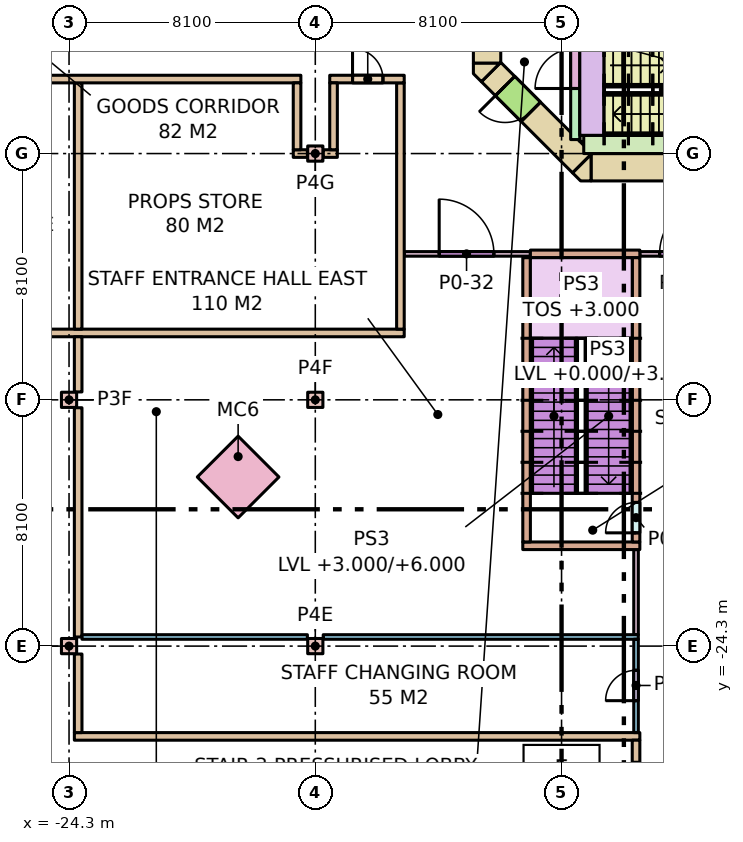
"""IFC4 building model, lengths in metres.
Left out: names, types, materials, properties, quantities, classifications, styles, units other than length and angle.
Written with IfcOpenShell. Run it as: python <this file> out.ifc"""

import sys

from ifc_helpers import new_model, si_unit, direction, frame, frame_2d, origin, origin_2d, place, context, subcontext, project, spatial, polyline, rectangle, outline, extrude, element, fill, save


model = new_model("IFC4")
c1 = context("Model", 3, precision=1e-05, world=origin(), true_north=direction((0.0, 1.0)))
c2 = subcontext(c1, "Body", "Model", "MODEL_VIEW")
j1 = project(units=[si_unit("LENGTHUNIT", "METRE"), si_unit("PLANEANGLEUNIT", "RADIAN")], contexts=[c1])
p1 = place(None, origin())
s1 = spatial("IfcSite", under=j1, at=p1, CompositionType="ELEMENT")
p2 = place(p1, origin())
s2 = spatial("IfcBuilding", under=s1, at=p2, CompositionType="ELEMENT")
p3 = place(p2, origin())
s3 = spatial("IfcBuildingStorey", under=s2, at=p3, CompositionType="ELEMENT", Elevation=0.0)
for number, where, z_axis, x_axis in (
    (1, (-24.3, -24.3, 0.0), (0.0, 0.0, 1.0), (1.0, 0.0, 0.0)),
    (2, (-24.3, -16.2, 0.0), (0.0, 0.0, 1.0), (1.0, 0.0, 0.0)),
    (3, (-16.2, -24.3, 0.0), (0.0, 0.0, 1.0), (1.0, 0.0, 0.0)),
    (4, (-16.2, -16.2, 0.0), (0.0, 0.0, 1.0), (1.0, 0.0, 0.0)),
    (5, (-16.2, -8.1, 0.0), (0.0, 0.0, 1.0), (1.0, 0.0, 0.0)),
):
    element("IfcColumn", number, at=place(p3, frame(where, z_axis=z_axis, x_axis=x_axis)), inside=s3, PredefinedType="COLUMN", context=c2, shape_type="SweptSolid", body=[
        extrude(rectangle(XDim=0.5, YDim=0.5, at=origin_2d()), origin(), (0.0, 0.0, 1.0), 6.0),
    ])
p4 = place(p3, frame((-18.738, -18.738, 0.0), z_axis=(0.0, 0.0, 1.0), x_axis=(0.707106781187, -0.707106781187, 0.0)))
e6 = element("IfcColumn", 6, at=p4, inside=s3, PredefinedType="COLUMN", context=c2, shape_type="SweptSolid", body=[
    extrude(rectangle(XDim=1.9, YDim=1.9, at=origin_2d()), origin(), (0.0, 0.0, 1.0), 6.0),
])
p5 = place(p3, frame((-7.13, -8.55, -0.32), z_axis=(0.0, 0.0, 1.0), x_axis=(1.0, 0.0, 0.0)))
e7 = element("IfcWall", 7, at=p5, inside=s3, PredefinedType="SHEAR", context=c2, shape_type="SweptSolid", body=[
    extrude(rectangle(XDim=14.26, YDim=0.9, at=frame_2d((7.13, 0.0))), origin(), (0.0, 0.0, 1.0), 6.0),
])
p6 = place(p5, frame((8.08, 0.0, 0.32)))
e8 = element("IfcOpeningElement", 8, at=p6, cuts=e7, PredefinedType="OPENING", context=c2, shape_type="SweptSolid", body=[
    extrude(rectangle(XDim=0.7, YDim=2.1, at=frame_2d((0.35, 1.05))), frame((0.0, 0.46, 0.0), z_axis=(0.0, -1.0, 0.0), x_axis=(1.0, 0.0, 0.0)), (0.0, 0.0, 1.0), 0.92),
])
p7 = place(p5, frame((5.58, 0.0, 0.32)))
e9 = element("IfcOpeningElement", 9, at=p7, cuts=e7, PredefinedType="OPENING", context=c2, shape_type="SweptSolid", body=[
    extrude(rectangle(XDim=0.85, YDim=2.1, at=frame_2d((0.425, 1.05))), frame((0.0, 0.46, 0.0), z_axis=(0.0, -1.0, 0.0), x_axis=(1.0, 0.0, 0.0)), (0.0, 0.0, 1.0), 0.92),
])
p8 = place(p5, frame((6.88, 0.0, 0.32)))
e10 = element("IfcOpeningElement", 10, at=p8, cuts=e7, PredefinedType="OPENING", context=c2, shape_type="SweptSolid", body=[
    extrude(rectangle(XDim=0.85, YDim=2.1, at=frame_2d((0.425, 1.05))), frame((0.0, 0.46, 0.0), z_axis=(0.0, -1.0, 0.0), x_axis=(1.0, 0.0, 0.0)), (0.0, 0.0, 1.0), 0.92),
])
p9 = place(p5, frame((9.967, 0.0, 0.32)))
e11 = element("IfcOpeningElement", 11, at=p9, cuts=e7, PredefinedType="OPENING", context=c2, shape_type="SweptSolid", body=[
    extrude(rectangle(XDim=0.9, YDim=2.1, at=frame_2d((0.45, 1.05))), frame((0.0, 0.46, 0.0), z_axis=(0.0, -1.0, 0.0), x_axis=(1.0, 0.0, 0.0)), (0.0, 0.0, 1.0), 0.92),
])
p10 = place(p5, frame((12.567, 0.0, 0.32)))
e12 = element("IfcOpeningElement", 12, at=p10, cuts=e7, PredefinedType="OPENING", context=c2, shape_type="SweptSolid", body=[
    extrude(rectangle(XDim=0.9, YDim=2.1, at=frame_2d((0.45, 1.05))), frame((0.0, 0.46, 0.0), z_axis=(0.0, -1.0, 0.0), x_axis=(1.0, 0.0, 0.0)), (0.0, 0.0, 1.0), 0.92),
])
p11 = place(p3, frame((-10.55, -5.13, -0.32), z_axis=(0.0, 0.0, 1.0), x_axis=(0.0, 1.0, 0.0)))
e13 = element("IfcWall", 13, at=p11, inside=s3, PredefinedType="SHEAR", context=c2, shape_type="SweptSolid", body=[
    extrude(rectangle(XDim=10.26, YDim=0.9, at=frame_2d((5.13, 0.0))), origin(), (0.0, 0.0, 1.0), 6.0),
])
p12 = place(p11, frame((4.13, 0.0, 0.32)))
e14 = element("IfcOpeningElement", 14, at=p12, cuts=e13, PredefinedType="OPENING", context=c2, shape_type="SweptSolid", body=[
    extrude(rectangle(XDim=2.0, YDim=2.1, at=frame_2d((1.0, 1.05))), frame((0.0, 0.46, 0.0), z_axis=(0.0, -1.0, 0.0), x_axis=(1.0, 0.0, 0.0)), (0.0, 0.0, 1.0), 0.92),
])
p13 = place(p3, frame((-7.418, -8.418, -0.32), z_axis=(0.0, 0.0, 1.0), x_axis=(-0.707106781187, 0.707106781187, 0.0)))
e15 = element("IfcWall", 15, at=p13, inside=s3, PredefinedType="SHEAR", context=c2, shape_type="SweptSolid", body=[
    extrude(rectangle(XDim=4.243, YDim=0.9, at=frame_2d((2.121, 0.0))), origin(), (0.0, 0.0, 1.0), 6.0),
])
p14 = place(p13, frame((2.393, 0.0, 0.32)))
e16 = element("IfcOpeningElement", 16, at=p14, cuts=e15, PredefinedType="OPENING", context=c2, shape_type="SweptSolid", body=[
    extrude(rectangle(XDim=1.2, YDim=2.1, at=frame_2d((0.6, 1.05))), frame((0.0, 0.46, 0.0), z_axis=(0.0, -1.0, 0.0), x_axis=(1.0, 0.0, 0.0)), (0.0, 0.0, 1.0), 0.92),
])
p15 = place(p3, frame((0.0, 0.0, -0.32)))
e17 = element("IfcWall", 17, at=p15, inside=s3, PredefinedType="SHEAR", context=c2, shape_type="SweptSolid", body=[
    extrude(outline(polyline([(-7.473, -9.0), (-7.736, -8.736), (-7.13, -8.13), (-7.13, -9.0), (-7.473, -9.0)])), origin(), (0.0, 0.0, 1.0), 6.0),
])
p16 = place(p3, frame((0.0, 0.0, -0.32)))
e18 = element("IfcWall", 18, at=p16, inside=s3, PredefinedType="SHEAR", context=c2, shape_type="SweptSolid", body=[
    extrude(outline(polyline([(-11.0, -5.473), (-11.0, -5.13), (-10.13, -5.13), (-10.736, -5.736), (-11.0, -5.473)])), origin(), (0.0, 0.0, 1.0), 6.0),
])
p17 = place(p3, frame((-7.65, -7.64, 0.0), z_axis=(0.0, 0.0, 1.0), x_axis=(0.0, 1.0, 0.0)))
e19 = element("IfcWall", 19, at=p17, inside=s3, PredefinedType="SHEAR", context=c2, shape_type="SweptSolid", body=[
    extrude(rectangle(XDim=3.14, YDim=0.3, at=frame_2d((1.57, 0.0))), origin(), (0.0, 0.0, 1.0), 5.68),
])
p18 = place(p17, frame((1.68, 0.0, 0.0)))
e20 = element("IfcOpeningElement", 20, at=p18, cuts=e19, PredefinedType="OPENING", context=c2, shape_type="SweptSolid", body=[
    extrude(rectangle(XDim=1.32, YDim=2.1, at=frame_2d((0.66, 1.05))), frame((0.0, 0.16, 0.0), z_axis=(0.0, -1.0, 0.0), x_axis=(1.0, 0.0, 0.0)), (0.0, 0.0, 1.0), 0.32),
])
p19 = place(p3, frame((-7.5, -7.6, 0.0), z_axis=(0.0, 0.0, 1.0), x_axis=(1.0, 0.0, 0.0)))
e21 = element("IfcWall", 21, at=p19, inside=s3, PredefinedType="SHEAR", context=c2, shape_type="SweptSolid", body=[
    extrude(rectangle(XDim=0.6, YDim=0.2, at=frame_2d((0.3, 0.0))), origin(), (0.0, 0.0, 1.0), 5.68),
])
p20 = place(p3, frame((-7.37, -7.8, 0.0), z_axis=(0.0, 0.0, 1.0), x_axis=(1.0, 0.0, 0.0)))
e22 = element("IfcWall", 22, at=p20, inside=s3, PredefinedType="SHEAR", context=c2, shape_type="SweptSolid", body=[
    extrude(rectangle(XDim=5.37, YDim=0.6, at=frame_2d((2.685, 0.0))), origin(), (0.0, 0.0, 1.0), 5.68),
])
p21 = place(p3, frame((-24.125, -27.27, 0.0), z_axis=(0.0, 0.0, 1.0), x_axis=(1.0, 0.0, 0.0)))
e23 = element("IfcWall", 23, at=p21, inside=s3, PredefinedType="PARTITIONING", context=c2, shape_type="SweptSolid", body=[
    extrude(rectangle(XDim=18.6, YDim=0.25, at=frame_2d((9.3, 0.0))), origin(), (0.0, 0.0, 1.0), 5.68),
])
p22 = place(p3, frame((-24.0, -27.145, 0.0), z_axis=(0.0, 0.0, 1.0), x_axis=(0.0, 1.0, 0.0)))
e24 = element("IfcWall", 24, at=p22, inside=s3, PredefinedType="PARTITIONING", context=c2, shape_type="SweptSolid", body=[
    extrude(rectangle(XDim=2.585, YDim=0.25, at=frame_2d((1.292, 0.0))), origin(), (0.0, 0.0, 1.0), 5.68),
])
p23 = place(p3, frame((-23.875, -24.0, 0.0), z_axis=(0.0, 0.0, 1.0), x_axis=(1.0, 0.0, 0.0)))
e25 = element("IfcWall", 25, at=p23, inside=s3, PredefinedType="PARTITIONING", context=c2, shape_type="SweptSolid", body=[
    extrude(rectangle(XDim=7.415, YDim=0.15, at=frame_2d((3.708, 0.0))), origin(), (0.0, 0.0, 1.0), 5.68),
])
p24 = place(p3, frame((-15.94, -24.0, 0.0), z_axis=(0.0, 0.0, 1.0), x_axis=(1.0, 0.0, 0.0)))
e26 = element("IfcWall", 26, at=p24, inside=s3, PredefinedType="PARTITIONING", context=c2, shape_type="SweptSolid", body=[
    extrude(rectangle(XDim=10.365, YDim=0.15, at=frame_2d((5.183, 0.0))), origin(), (0.0, 0.0, 1.0), 5.68),
])
p25 = place(p3, frame((-5.65, -27.145, 0.0), z_axis=(0.0, 0.0, 1.0), x_axis=(0.0, 1.0, 0.0)))
e27 = element("IfcWall", 27, at=p25, inside=s3, PredefinedType="PARTITIONING", context=c2, shape_type="SweptSolid", body=[
    extrude(rectangle(XDim=3.07, YDim=0.15, at=frame_2d((1.535, 0.0))), origin(), (0.0, 0.0, 1.0), 5.68),
])
p26 = place(p25, frame((1.05, 0.0, 0.0)))
e28 = element("IfcOpeningElement", 28, at=p26, cuts=e27, PredefinedType="OPENING", context=c2, shape_type="SweptSolid", body=[
    extrude(rectangle(XDim=1.0, YDim=2.1, at=frame_2d((0.5, 1.05))), frame((0.0, 0.085, 0.0), z_axis=(0.0, -1.0, 0.0), x_axis=(1.0, 0.0, 0.0)), (0.0, 0.0, 1.0), 0.17),
])
p27 = place(p3, frame((-37.5, -14.0, 0.0), z_axis=(0.0, 0.0, 1.0), x_axis=(1.0, 0.0, 0.0)))
e29 = element("IfcWall", 29, at=p27, inside=s3, PredefinedType="PARTITIONING", context=c2, shape_type="SweptSolid", body=[
    extrude(rectangle(XDim=24.225, YDim=0.25, at=frame_2d((12.113, 0.0))), origin(), (0.0, 0.0, 1.0), 5.68),
])
p28 = place(p3, frame((-24.0, -24.0, 0.0), z_axis=(0.0, 0.0, 1.0), x_axis=(0.0, 1.0, 0.0)))
e30 = element("IfcWall", 30, at=p28, inside=s3, PredefinedType="PARTITIONING", context=c2, shape_type="SweptSolid", body=[
    extrude(rectangle(XDim=7.54, YDim=0.25, at=frame_2d((3.77, 0.0))), origin(), (0.0, 0.0, 1.0), 5.68),
])
p29 = place(p3, frame((-24.0, -15.94, 0.0), z_axis=(0.0, 0.0, 1.0), x_axis=(0.0, 1.0, 0.0)))
e31 = element("IfcWall", 31, at=p29, inside=s3, PredefinedType="PARTITIONING", context=c2, shape_type="SweptSolid", body=[
    extrude(rectangle(XDim=1.815, YDim=0.25, at=frame_2d((0.907, 0.0))), origin(), (0.0, 0.0, 1.0), 5.68),
])
p30 = place(p3, frame((-5.65, -29.875, 0.0), z_axis=(0.0, 0.0, 1.0), x_axis=(0.0, 1.0, 0.0)))
e32 = element("IfcWall", 32, at=p30, inside=s3, PredefinedType="PARTITIONING", context=c2, shape_type="SweptSolid", body=[
    extrude(rectangle(XDim=2.48, YDim=0.25, at=frame_2d((1.24, 0.0))), origin(), (0.0, 0.0, 1.0), 5.68),
])
p31 = place(p30, frame((0.75, 0.0, 0.0)))
e33 = element("IfcOpeningElement", 33, at=p31, cuts=e32, PredefinedType="OPENING", context=c2, shape_type="SweptSolid", body=[
    extrude(rectangle(XDim=1.0, YDim=2.1, at=frame_2d((0.5, 1.05))), frame((0.0, 0.135, 0.0), z_axis=(0.0, -1.0, 0.0), x_axis=(1.0, 0.0, 0.0)), (0.0, 0.0, 1.0), 0.27),
])
p32 = place(p3, frame((-24.0, -13.875, 0.0), z_axis=(0.0, 0.0, 1.0), x_axis=(0.0, 1.0, 0.0)))
e34 = element("IfcWall", 34, at=p32, inside=s3, PredefinedType="PARTITIONING", context=c2, shape_type="SweptSolid", body=[
    extrude(rectangle(XDim=8.1, YDim=0.25, at=frame_2d((4.05, 0.0))), origin(), (0.0, 0.0, 1.0), 5.68),
])
p33 = place(p3, frame((-31.925, -5.65, 0.0), z_axis=(0.0, 0.0, 1.0), x_axis=(1.0, 0.0, 0.0)))
e35 = element("IfcWall", 35, at=p33, inside=s3, PredefinedType="PARTITIONING", context=c2, shape_type="SweptSolid", body=[
    extrude(rectangle(XDim=15.25, YDim=0.25, at=frame_2d((7.625, 0.0))), origin(), (0.0, 0.0, 1.0), 5.68),
])
p34 = place(p33, frame((3.55, 0.0, 0.0)))
e36 = element("IfcOpeningElement", 36, at=p34, cuts=e35, PredefinedType="OPENING", context=c2, shape_type="SweptSolid", body=[
    extrude(rectangle(XDim=1.0, YDim=2.1, at=frame_2d((0.5, 1.05))), frame((0.0, 0.135, 0.0), z_axis=(0.0, -1.0, 0.0), x_axis=(1.0, 0.0, 0.0)), (0.0, 0.0, 1.0), 0.27),
])
p35 = place(p3, frame((-9.125, -11.4, 0.0), z_axis=(0.0, 0.0, 1.0), x_axis=(1.0, 0.0, 0.0)))
e37 = element("IfcWall", 37, at=p35, inside=s3, PredefinedType="STANDARD", context=c2, shape_type="SweptSolid", body=[
    extrude(rectangle(XDim=3.6, YDim=0.25, at=frame_2d((1.8, 0.0))), origin(), (0.0, 0.0, 1.0), 5.68),
])
p36 = place(p3, frame((-9.375, -21.0, 0.0), z_axis=(0.0, 0.0, 1.0), x_axis=(1.0, 0.0, 0.0)))
e38 = element("IfcWall", 38, at=p36, inside=s3, PredefinedType="STANDARD", context=c2, shape_type="SweptSolid", body=[
    extrude(rectangle(XDim=3.85, YDim=0.25, at=frame_2d((1.925, 0.0))), origin(), (0.0, 0.0, 1.0), 5.68),
])
p37 = place(p3, frame((-9.25, -20.875, 0.0), z_axis=(0.0, 0.0, 1.0), x_axis=(0.0, 1.0, 0.0)))
e39 = element("IfcWall", 39, at=p37, inside=s3, PredefinedType="STANDARD", context=c2, shape_type="SweptSolid", body=[
    extrude(rectangle(XDim=9.35, YDim=0.25, at=frame_2d((4.675, 0.0))), origin(), (0.0, 0.0, 1.0), 5.68),
])
p38 = place(p3, frame((-5.65, -20.875, 0.0), z_axis=(0.0, 0.0, 1.0), x_axis=(0.0, 1.0, 0.0)))
e40 = element("IfcWall", 40, at=p38, inside=s3, PredefinedType="STANDARD", context=c2, shape_type="SweptSolid", body=[
    extrude(rectangle(XDim=9.35, YDim=0.25, at=frame_2d((4.675, 0.0))), origin(), (0.0, 0.0, 1.0), 5.68),
])
p39 = place(p38, frame((0.3, 0.0, 0.0)))
e41 = element("IfcOpeningElement", 41, at=p39, cuts=e40, PredefinedType="OPENING", context=c2, shape_type="SweptSolid", body=[
    extrude(rectangle(XDim=1.0, YDim=2.1, at=frame_2d((0.5, 1.05))), frame((0.0, 0.135, 0.0), z_axis=(0.0, -1.0, 0.0), x_axis=(1.0, 0.0, 0.0)), (0.0, 0.0, 1.0), 0.27),
])
p40 = place(p3, frame((-13.4, -13.875, 0.0), z_axis=(0.0, 0.0, 1.0), x_axis=(0.0, 1.0, 0.0)))
e42 = element("IfcWall", 42, at=p40, inside=s3, PredefinedType="PARTITIONING", context=c2, shape_type="SweptSolid", body=[
    extrude(rectangle(XDim=8.1, YDim=0.25, at=frame_2d((4.05, 0.0))), origin(), (0.0, 0.0, 1.0), 5.68),
])
p41 = place(p3, frame((-16.925, -8.1, 0.0), z_axis=(0.0, 0.0, 1.0), x_axis=(1.0, 0.0, 0.0)))
e43 = element("IfcWall", 43, at=p41, inside=s3, PredefinedType="PARTITIONING", context=c2, shape_type="SweptSolid", body=[
    extrude(rectangle(XDim=0.465, YDim=0.25, at=frame_2d((0.232, 0.0))), origin(), (0.0, 0.0, 1.0), 5.68),
])
p42 = place(p3, frame((-15.94, -8.1, 0.0), z_axis=(0.0, 0.0, 1.0), x_axis=(1.0, 0.0, 0.0)))
e44 = element("IfcWall", 44, at=p42, inside=s3, PredefinedType="PARTITIONING", context=c2, shape_type="SweptSolid", body=[
    extrude(rectangle(XDim=0.465, YDim=0.25, at=frame_2d((0.232, 0.0))), origin(), (0.0, 0.0, 1.0), 5.68),
])
p43 = place(p3, frame((-15.725, -5.65, 0.0), z_axis=(0.0, 0.0, 1.0), x_axis=(1.0, 0.0, 0.0)))
e45 = element("IfcWall", 45, at=p43, inside=s3, PredefinedType="PARTITIONING", context=c2, shape_type="SweptSolid", body=[
    extrude(rectangle(XDim=2.45, YDim=0.25, at=frame_2d((1.225, 0.0))), origin(), (0.0, 0.0, 1.0), 5.68),
])
p44 = place(p43, frame((0.75, 0.0, 0.0)))
e46 = element("IfcOpeningElement", 46, at=p44, cuts=e45, PredefinedType="OPENING", context=c2, shape_type="SweptSolid", body=[
    extrude(rectangle(XDim=1.0, YDim=2.1, at=frame_2d((0.5, 1.05))), frame((0.0, 0.135, 0.0), z_axis=(0.0, -1.0, 0.0), x_axis=(1.0, 0.0, 0.0)), (0.0, 0.0, 1.0), 0.27),
])
for number, where, z_axis, x_axis in (
    (47, (-16.8, -7.975, 0.0), (0.0, 0.0, 1.0), (0.0, 1.0, 0.0)),
    (48, (-15.6, -7.975, 0.0), (0.0, 0.0, 1.0), (0.0, 1.0, 0.0)),
):
    element("IfcWall", number, at=place(p3, frame(where, z_axis=z_axis, x_axis=x_axis)), inside=s3, PredefinedType="PARTITIONING", context=c2, shape_type="SweptSolid", body=[
        extrude(rectangle(XDim=2.2, YDim=0.25, at=frame_2d((1.1, 0.0))), origin(), (0.0, 0.0, 1.0), 5.68),
    ])
p45 = place(p3, frame((-13.275, -11.4, 0.0), z_axis=(0.0, 0.0, 1.0), x_axis=(1.0, 0.0, 0.0)))
e49 = element("IfcWall", 49, at=p45, inside=s3, PredefinedType="PARTITIONING", context=c2, shape_type="SweptSolid", body=[
    extrude(rectangle(XDim=4.15, YDim=0.15, at=frame_2d((2.075, 0.0))), origin(), (0.0, 0.0, 1.0), 5.68),
])
p46 = place(p45, frame((1.15, 0.0, 0.0)))
e50 = element("IfcOpeningElement", 50, at=p46, cuts=e49, PredefinedType="OPENING", context=c2, shape_type="SweptSolid", body=[
    extrude(rectangle(XDim=1.8, YDim=2.4, at=frame_2d((0.9, 1.2))), frame((0.0, 0.085, 0.0), z_axis=(0.0, -1.0, 0.0), x_axis=(1.0, 0.0, 0.0)), (0.0, 0.0, 1.0), 0.17),
])
p47 = place(p3, frame((-5.525, -11.4, 0.0), z_axis=(0.0, 0.0, 1.0), x_axis=(1.0, 0.0, 0.0)))
e51 = element("IfcWall", 51, at=p47, inside=s3, PredefinedType="PARTITIONING", context=c2, shape_type="SweptSolid", body=[
    extrude(rectangle(XDim=3.2, YDim=0.15, at=frame_2d((1.6, 0.0))), origin(), (0.0, 0.0, 1.0), 5.68),
])
p48 = place(p47, frame((0.65, 0.0, 0.0)))
e52 = element("IfcOpeningElement", 52, at=p48, cuts=e51, PredefinedType="OPENING", context=c2, shape_type="SweptSolid", body=[
    extrude(rectangle(XDim=1.8, YDim=2.4, at=frame_2d((0.9, 1.2))), frame((0.0, 0.085, 0.0), z_axis=(0.0, -1.0, 0.0), x_axis=(1.0, 0.0, 0.0)), (0.0, 0.0, 1.0), 0.17),
])
p49 = place(p3, frame((-5.65, -23.925, 0.0), z_axis=(0.0, 0.0, 1.0), x_axis=(0.0, 1.0, 0.0)))
e53 = element("IfcWall", 53, at=p49, inside=s3, PredefinedType="PARTITIONING", context=c2, shape_type="SweptSolid", body=[
    extrude(rectangle(XDim=2.8, YDim=0.15, at=frame_2d((1.4, 0.0))), origin(), (0.0, 0.0, 1.0), 5.68),
])
p50 = place(p18, origin())
e54 = element("IfcDoor", 54, at=p50, inside=s3, OperationType="DOUBLE_DOOR_SINGLE_SWING", PredefinedType="DOOR", context=c2, shape_type="SweptSolid", body=[
    extrude(rectangle(XDim=1.32, YDim=2.1, at=frame_2d((0.66, 1.05))), frame((0.0, 0.025, 0.0), z_axis=(0.0, -1.0, 0.0), x_axis=(1.0, 0.0, 0.0)), (0.0, 0.0, 1.0), 0.05),
])
fill(e20, e54)
p51 = place(p14, origin())
e55 = element("IfcDoor", 55, at=p51, inside=s3, OperationType="SINGLE_SWING_RIGHT", PredefinedType="DOOR", context=c2, shape_type="SweptSolid", body=[
    extrude(rectangle(XDim=1.2, YDim=2.1, at=frame_2d((0.6, 1.05))), frame((0.0, 0.025, 0.0), z_axis=(0.0, -1.0, 0.0), x_axis=(1.0, 0.0, 0.0)), (0.0, 0.0, 1.0), 0.05),
])
fill(e16, e55)
p52 = place(p39, origin())
e56 = element("IfcDoor", 56, at=p52, inside=s3, OperationType="SINGLE_SWING_LEFT", PredefinedType="DOOR", context=c2, shape_type="SweptSolid", body=[
    extrude(rectangle(XDim=1.0, YDim=2.1, at=frame_2d((0.5, 1.05))), frame((0.0, 0.025, 0.0), z_axis=(0.0, -1.0, 0.0), x_axis=(1.0, 0.0, 0.0)), (0.0, 0.0, 1.0), 0.05),
])
fill(e41, e56)
p53 = place(p44, origin())
e57 = element("IfcDoor", 57, at=p53, inside=s3, OperationType="SINGLE_SWING_LEFT", PredefinedType="DOOR", context=c2, shape_type="SweptSolid", body=[
    extrude(rectangle(XDim=1.0, YDim=2.1, at=frame_2d((0.5, 1.05))), frame((0.0, 0.025, 0.0), z_axis=(0.0, -1.0, 0.0), x_axis=(1.0, 0.0, 0.0)), (0.0, 0.0, 1.0), 0.05),
])
fill(e46, e57)
p54 = place(p26, origin())
e58 = element("IfcDoor", 58, at=p54, inside=s3, OperationType="SINGLE_SWING_LEFT", PredefinedType="DOOR", context=c2, shape_type="SweptSolid", body=[
    extrude(rectangle(XDim=1.0, YDim=2.1, at=frame_2d((0.5, 1.05))), frame((0.0, 0.025, 0.0), z_axis=(0.0, -1.0, 0.0), x_axis=(1.0, 0.0, 0.0)), (0.0, 0.0, 1.0), 0.05),
])
fill(e28, e58)
p55 = place(p31, origin())
e59 = element("IfcDoor", 59, at=p55, inside=s3, OperationType="SINGLE_SWING_LEFT", PredefinedType="DOOR", context=c2, shape_type="SweptSolid", body=[
    extrude(rectangle(XDim=1.0, YDim=2.1, at=frame_2d((0.5, 1.05))), frame((0.0, 0.025, 0.0), z_axis=(0.0, -1.0, 0.0), x_axis=(1.0, 0.0, 0.0)), (0.0, 0.0, 1.0), 0.05),
])
fill(e33, e59)
p56 = place(p46, origin())
e60 = element("IfcDoor", 60, at=p56, inside=s3, OperationType="SINGLE_SWING_LEFT", PredefinedType="DOOR", context=c2, shape_type="SweptSolid", body=[
    extrude(rectangle(XDim=1.8, YDim=2.4, at=frame_2d((0.9, 1.2))), frame((0.0, 0.025, 0.0), z_axis=(0.0, -1.0, 0.0), x_axis=(1.0, 0.0, 0.0)), (0.0, 0.0, 1.0), 0.05),
])
fill(e50, e60)
p57 = place(p48, frame((1.8, 0.0, 0.0), z_axis=(0.0, 0.0, 1.0), x_axis=(-1.0, 0.0, 0.0)))
e61 = element("IfcDoor", 61, at=p57, inside=s3, OperationType="SINGLE_SWING_RIGHT", PredefinedType="DOOR", context=c2, shape_type="SweptSolid", body=[
    extrude(rectangle(XDim=1.8, YDim=2.4, at=frame_2d((0.9, 1.2))), frame((0.0, 0.025, 0.0), z_axis=(0.0, -1.0, 0.0), x_axis=(1.0, 0.0, 0.0)), (0.0, 0.0, 1.0), 0.05),
])
fill(e52, e61)
save(model, sys.argv[1])
